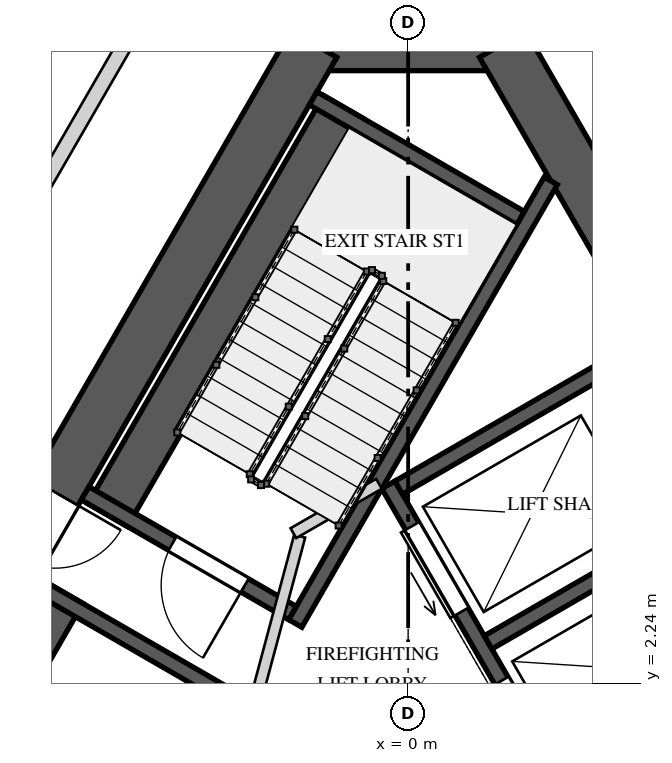
"""IFC4 building model, lengths in metres.
Left out: names, types, materials, properties, quantities, classifications, styles, units other than length and angle.
Written with IfcOpenShell. Run it as: python <this file> out.ifc"""

import sys

from ifc_helpers import new_model, si_unit, direction, frame, frame_2d, origin, place, context, subcontext, project, spatial, rectangle, extrude, element, fill, save


model = new_model("IFC4")
c1 = context("Model", 3, precision=1e-05, world=origin(), true_north=direction((0.0, 1.0)))
c2 = subcontext(c1, "Body", "Model", "MODEL_VIEW")
j1 = project(units=[si_unit("LENGTHUNIT", "METRE"), si_unit("PLANEANGLEUNIT", "RADIAN")], contexts=[c1])
p1 = place(None, origin())
s1 = spatial("IfcSite", under=j1, at=p1, CompositionType="ELEMENT")
p2 = place(p1, origin())
s2 = spatial("IfcBuilding", under=s1, at=p2, CompositionType="ELEMENT")
p3 = place(p2, frame((0.0, 0.0, 245.2)))
s3 = spatial("IfcBuildingStorey", under=s2, at=p3, CompositionType="ELEMENT", Elevation=245.2)
p4 = place(p3, frame((1.443, 10.65, 0.0), z_axis=(0.0, 0.0, 1.0), x_axis=(-1.0, 0.0, 0.0)))
e1 = element("IfcWall", 1, at=p4, inside=s3, PredefinedType="SHEAR", context=c2, shape_type="SweptSolid", body=[
    extrude(rectangle(XDim=2.887, YDim=0.7, at=frame_2d((1.443, 0.0))), origin(), (0.0, 0.0, 1.0), 4.0),
])
p5 = place(p3, frame((-1.241, 10.65, 0.0), z_axis=(0.0, 0.0, 1.0), x_axis=(-0.500003331888, -0.866023480109, 0.0)))
e2 = element("IfcWall", 2, at=p5, inside=s3, PredefinedType="SHEAR", context=c2, shape_type="SweptSolid", body=[
    extrude(rectangle(XDim=17.205, YDim=0.7, at=frame_2d((8.603, 0.0))), origin(), (0.0, 0.0, 1.0), 4.0),
])
p6 = place(p5, frame((6.808, 0.0, 0.0)))
e3 = element("IfcOpeningElement", 3, at=p6, cuts=e2, PredefinedType="OPENING", context=c2, shape_type="SweptSolid", body=[
    extrude(rectangle(XDim=1.0, YDim=2.4, at=frame_2d((0.5, 1.2))), frame((0.0, 0.36, 0.0), z_axis=(0.0, -1.0, 0.0), x_axis=(1.0, 0.0, 0.0)), (0.0, 0.0, 1.0), 0.72),
])
p7 = place(p5, frame((14.922, 0.0, 0.0)))
e4 = element("IfcOpeningElement", 4, at=p7, cuts=e2, PredefinedType="OPENING", context=c2, shape_type="SweptSolid", body=[
    extrude(rectangle(XDim=0.8, YDim=2.1, at=frame_2d((0.4, 1.05))), frame((0.0, 0.36, 0.0), z_axis=(0.0, -1.0, 0.0), x_axis=(1.0, 0.0, 0.0)), (0.0, 0.0, 1.0), 0.72),
])
p8 = place(p3, frame((9.844, -4.25, 0.0), z_axis=(0.0, 0.0, 1.0), x_axis=(-0.500003331888, 0.866023480109, 0.0)))
e5 = element("IfcWall", 5, at=p8, inside=s3, PredefinedType="SHEAR", context=c2, shape_type="SweptSolid", body=[
    extrude(rectangle(XDim=17.205, YDim=0.7, at=frame_2d((8.603, 0.0))), origin(), (0.0, 0.0, 1.0), 4.0),
])
p9 = place(p8, frame((6.877, 0.0, 0.0)))
e6 = element("IfcOpeningElement", 6, at=p9, cuts=e5, PredefinedType="OPENING", context=c2, shape_type="SweptSolid", body=[
    extrude(rectangle(XDim=1.0, YDim=2.4, at=frame_2d((0.5, 1.2))), frame((0.0, 0.36, 0.0), z_axis=(0.0, -1.0, 0.0), x_axis=(1.0, 0.0, 0.0)), (0.0, 0.0, 1.0), 0.72),
])
p10 = place(p3, frame((-0.853, 9.823, 0.0), z_axis=(0.0, 0.0, 1.0), x_axis=(-0.500009909098, -0.866019682689, 0.0)))
e7 = element("IfcWall", 7, at=p10, inside=s3, PredefinedType="SOLIDWALL", context=c2, shape_type="SweptSolid", body=[
    extrude(rectangle(XDim=6.2, YDim=0.6, at=frame_2d((3.1, 0.0))), origin(), (0.0, 0.0, 1.0), 3.65),
])
p11 = place(p3, frame((1.876, 8.85, 0.0), z_axis=(0.0, 0.0, 1.0), x_axis=(-0.499998042495, -0.866026533947, 0.0)))
e8 = element("IfcWall", 8, at=p11, inside=s3, PredefinedType="SOLIDWALL", context=c2, shape_type="SweptSolid", body=[
    extrude(rectangle(XDim=6.723, YDim=0.2, at=frame_2d((3.361, 0.0))), origin(), (0.0, 0.0, 1.0), 3.65),
])
p12 = place(p3, frame((1.479, 8.361, 0.0), z_axis=(0.0, 0.0, 1.0), x_axis=(-0.866035871367, 0.499981869177, 0.0)))
e9 = element("IfcWall", 9, at=p12, inside=s3, PredefinedType="SOLIDWALL", context=c2, shape_type="SweptSolid", body=[
    extrude(rectangle(XDim=3.15, YDim=0.2, at=frame_2d((1.575, 0.0))), origin(), (0.0, 0.0, 1.0), 3.65),
])
p13 = place(p3, frame((-1.521, 3.165, 0.0), z_axis=(0.0, 0.0, 1.0), x_axis=(-0.866035871367, 0.499981869177, 0.0)))
e10 = element("IfcWall", 10, at=p13, inside=s3, PredefinedType="SOLIDWALL", context=c2, shape_type="SweptSolid", body=[
    extrude(rectangle(XDim=3.15, YDim=0.2, at=frame_2d((1.575, 0.0))), origin(), (0.0, 0.0, 1.0), 3.65),
])
p14 = place(p13, frame((0.725, 0.0, 0.0)))
e11 = element("IfcOpeningElement", 11, at=p14, cuts=e10, PredefinedType="OPENING", context=c2, shape_type="SweptSolid", body=[
    extrude(rectangle(XDim=1.1, YDim=2.4, at=frame_2d((0.55, 1.2))), frame((0.0, 0.11, 0.0), z_axis=(0.0, -1.0, 0.0), x_axis=(1.0, 0.0, 0.0)), (0.0, 0.0, 1.0), 0.22),
])
p15 = place(p3, frame((-4.538, 3.44, 0.0), z_axis=(0.0, 0.0, 1.0), x_axis=(-0.499996545922, -0.866027397988, 0.0)))
e12 = element("IfcWall", 12, at=p15, inside=s3, PredefinedType="SOLIDWALL", context=c2, shape_type="SweptSolid", body=[
    extrude(rectangle(XDim=5.5, YDim=0.6, at=frame_2d((2.75, 0.0))), origin(), (0.0, 0.0, 1.0), 3.65),
])
p16 = place(p3, frame((-2.38, 2.078, 0.0), z_axis=(0.0, 0.0, 1.0), x_axis=(-0.866060182126, 0.499939757307, 0.0)))
e13 = element("IfcWall", 13, at=p16, inside=s3, PredefinedType="SOLIDWALL", context=c2, shape_type="SweptSolid", body=[
    extrude(rectangle(XDim=2.95, YDim=0.2, at=frame_2d((1.475, 0.0))), origin(), (0.0, 0.0, 1.0), 3.65),
])
p17 = place(p3, frame((2.19, 0.606, 0.0), z_axis=(0.0, 0.0, 1.0), x_axis=(-0.500002801628, 0.866023786258, 0.0)))
e14 = element("IfcWall", 14, at=p17, inside=s3, PredefinedType="SOLIDWALL", context=c2, shape_type="SweptSolid", body=[
    extrude(rectangle(XDim=4.9, YDim=0.2, at=frame_2d((2.45, 0.0))), origin(), (0.0, 0.0, 1.0), 3.65),
])
p18 = place(p17, frame((0.625, 0.0, 0.0)))
e15 = element("IfcOpeningElement", 15, at=p18, cuts=e14, PredefinedType="OPENING", context=c2, shape_type="SweptSolid", body=[
    extrude(rectangle(XDim=1.3, YDim=2.1, at=frame_2d((0.65, 1.05))), frame((0.0, 0.11, 0.0), z_axis=(0.0, -1.0, 0.0), x_axis=(1.0, 0.0, 0.0)), (0.0, 0.0, 1.0), 0.22),
])
p19 = place(p17, frame((2.975, 0.0, 0.0)))
e16 = element("IfcOpeningElement", 16, at=p19, cuts=e14, PredefinedType="OPENING", context=c2, shape_type="SweptSolid", body=[
    extrude(rectangle(XDim=1.3, YDim=2.1, at=frame_2d((0.65, 1.05))), frame((0.0, 0.11, 0.0), z_axis=(0.0, -1.0, 0.0), x_axis=(1.0, 0.0, 0.0)), (0.0, 0.0, 1.0), 0.22),
])
p20 = place(p3, frame((2.227, 0.743, 0.0), z_axis=(0.0, 0.0, 1.0), x_axis=(0.866022959057, 0.500004234368, 0.0)))
e17 = element("IfcWall", 17, at=p20, inside=s3, PredefinedType="SOLIDWALL", context=c2, shape_type="SweptSolid", body=[
    extrude(rectangle(XDim=3.75, YDim=0.2, at=frame_2d((1.875, 0.0))), origin(), (0.0, 0.0, 1.0), 3.65),
])
p21 = place(p3, frame((1.052, 2.778, 0.0), z_axis=(0.0, 0.0, 1.0), x_axis=(0.866039234136, 0.499976044363, 0.0)))
e18 = element("IfcWall", 18, at=p21, inside=s3, PredefinedType="SOLIDWALL", context=c2, shape_type="SweptSolid", body=[
    extrude(rectangle(XDim=3.75, YDim=0.2, at=frame_2d((1.875, 0.0))), origin(), (0.0, 0.0, 1.0), 3.65),
])
p22 = place(p3, frame((-0.123, 4.813, 0.0), z_axis=(0.0, 0.0, 1.0), x_axis=(0.866022959057, 0.500004234368, 0.0)))
e19 = element("IfcWall", 19, at=p22, inside=s3, PredefinedType="SOLIDWALL", context=c2, shape_type="SweptSolid", body=[
    extrude(rectangle(XDim=3.75, YDim=0.2, at=frame_2d((1.875, 0.0))), origin(), (0.0, 0.0, 1.0), 3.65),
])
p23 = place(p3, frame((-2.178, 1.372, 0.0), z_axis=(0.0, 0.0, 1.0), x_axis=(0.258808958833, 0.96592852884, 0.0)))
e20 = element("IfcWall", 20, at=p23, inside=s3, PredefinedType="PARTITIONING", context=c2, shape_type="SweptSolid", body=[
    extrude(rectangle(XDim=2.903, YDim=0.15, at=frame_2d((1.451, 0.0))), origin(), (0.0, 0.0, 1.0), 3.65),
])
p24 = place(p3, frame((-1.51, 4.215, 0.0), z_axis=(0.0, 0.0, 1.0), x_axis=(0.866085525409, 0.49989585183, 0.0)))
e21 = element("IfcWall", 21, at=p24, inside=s3, PredefinedType="PARTITIONING", context=c2, shape_type="SweptSolid", body=[
    extrude(rectangle(XDim=1.3, YDim=0.15, at=frame_2d((0.65, 0.0))), origin(), (0.0, 0.0, 1.0), 3.65),
])
p25 = place(p3, frame((-6.04, 9.338, 0.0), z_axis=(0.0, 0.0, 1.0), x_axis=(0.500014044516, 0.866017295027, 0.0)))
e22 = element("IfcWall", 22, at=p25, inside=s3, PredefinedType="PARTITIONING", context=c2, shape_type="SweptSolid", body=[
    extrude(rectangle(XDim=5.556, YDim=0.15, at=frame_2d((2.778, 0.0))), origin(), (0.0, 0.0, 1.0), 3.65),
])
p26 = place(p25, frame((1.971, 0.0, 0.0)))
e23 = element("IfcOpeningElement", 23, at=p26, cuts=e22, PredefinedType="OPENING", context=c2, shape_type="SweptSolid", body=[
    extrude(rectangle(XDim=0.95, YDim=2.4, at=frame_2d((0.475, 1.2))), frame((0.0, 0.085, 0.0), z_axis=(0.0, -1.0, 0.0), x_axis=(1.0, 0.0, 0.0)), (0.0, 0.0, 1.0), 0.17),
])
p27 = place(p3, frame((-5.18, 8.127, 0.0), z_axis=(0.0, 0.0, 1.0), x_axis=(0.499995433041, 0.866028040503, 0.0)))
e24 = element("IfcWall", 24, at=p27, inside=s3, PredefinedType="SOLIDWALL", context=c2, shape_type="SweptSolid", body=[
    extrude(rectangle(XDim=5.161, YDim=0.2, at=frame_2d((2.581, 0.0))), origin(), (0.0, 0.0, 1.0), 3.65),
])
p28 = place(p3, frame((2.483, 12.8, 0.0), z_axis=(0.0, 0.0, 1.0), x_axis=(0.499956000529, -0.8660508054, 0.0)))
e25 = element("IfcWall", 25, at=p28, inside=s3, PredefinedType="SOLIDWALL", context=c2, shape_type="SweptSolid", body=[
    extrude(rectangle(XDim=2.745, YDim=0.2, at=frame_2d((1.373, 0.0))), origin(), (0.0, 0.0, 1.0), 3.65),
])
p29 = place(p14, origin())
e26 = element("IfcDoor", 26, at=p29, inside=s3, OperationType="SINGLE_SWING_RIGHT", PredefinedType="DOOR", context=c2, shape_type="SweptSolid", body=[
    extrude(rectangle(XDim=1.1, YDim=2.4, at=frame_2d((0.55, 1.2))), frame((0.0, 0.025, 0.0), z_axis=(0.0, -1.0, 0.0), x_axis=(1.0, 0.0, 0.0)), (0.0, 0.0, 1.0), 0.05),
])
fill(e11, e26)
p30 = place(p18, origin())
e27 = element("IfcDoor", 27, at=p30, inside=s3, OperationType="SLIDING_TO_RIGHT", PredefinedType="DOOR", context=c2, shape_type="SweptSolid", body=[
    extrude(rectangle(XDim=1.3, YDim=2.1, at=frame_2d((0.65, 1.05))), frame((0.0, 0.025, 0.0), z_axis=(0.0, -1.0, 0.0), x_axis=(1.0, 0.0, 0.0)), (0.0, 0.0, 1.0), 0.05),
])
fill(e15, e27)
p31 = place(p19, origin())
e28 = element("IfcDoor", 28, at=p31, inside=s3, OperationType="SLIDING_TO_LEFT", PredefinedType="DOOR", context=c2, shape_type="SweptSolid", body=[
    extrude(rectangle(XDim=1.3, YDim=2.1, at=frame_2d((0.65, 1.05))), frame((0.0, 0.025, 0.0), z_axis=(0.0, -1.0, 0.0), x_axis=(1.0, 0.0, 0.0)), (0.0, 0.0, 1.0), 0.05),
])
fill(e16, e28)
p32 = place(p6, origin())
e29 = element("IfcDoor", 29, at=p32, inside=s3, OperationType="SINGLE_SWING_LEFT", PredefinedType="DOOR", context=c2, shape_type="SweptSolid", body=[
    extrude(rectangle(XDim=1.0, YDim=2.4, at=frame_2d((0.5, 1.2))), frame((0.0, 0.025, 0.0), z_axis=(0.0, -1.0, 0.0), x_axis=(1.0, 0.0, 0.0)), (0.0, 0.0, 1.0), 0.05),
])
fill(e3, e29)
save(model, sys.argv[1])
